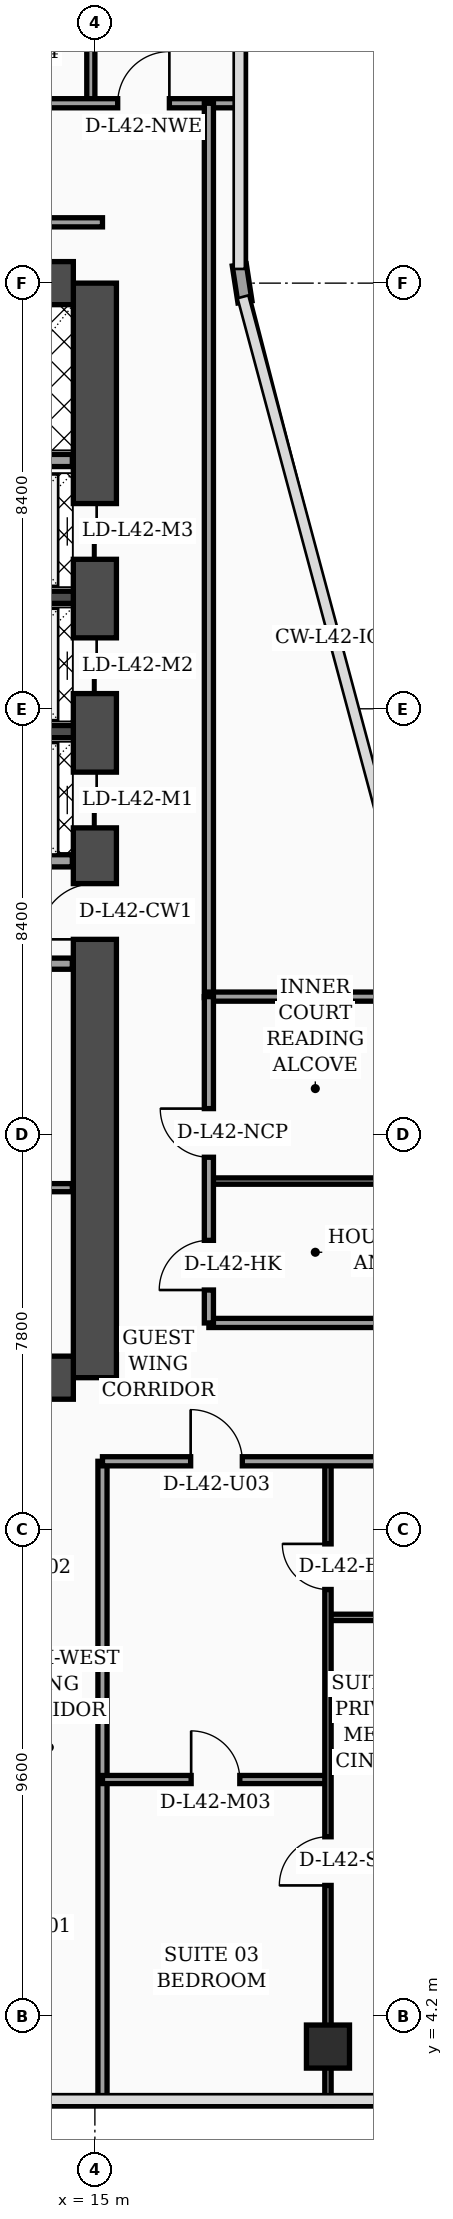
"""IFC4 building model, lengths in metres.
Left out: names, types, materials, properties, quantities, classifications, styles, units other than length and angle.
Written with IfcOpenShell. Run it as: python <this file> out.ifc"""

import sys

from ifc_helpers import new_model, si_unit, direction, frame, frame_2d, origin, origin_2d, place, context, subcontext, project, spatial, rectangle, hollow_rectangle, extrude, element, fill, save


model = new_model("IFC4")
c1 = context("Model", 3, precision=1e-05, world=origin(), true_north=direction((0.0, 1.0)))
c2 = subcontext(c1, "Body", "Model", "MODEL_VIEW")
j1 = project(units=[si_unit("LENGTHUNIT", "METRE"), si_unit("PLANEANGLEUNIT", "RADIAN")], contexts=[c1])
p1 = place(None, origin())
s1 = spatial("IfcSite", under=j1, at=p1, CompositionType="ELEMENT")
p2 = place(p1, origin())
s2 = spatial("IfcBuilding", under=s1, at=p2, CompositionType="ELEMENT")
p3 = place(p2, frame((0.0, 0.0, 171.3)))
s3 = spatial("IfcBuildingStorey", under=s2, at=p3, CompositionType="ELEMENT", Elevation=171.3)
p4 = place(p3, frame((15.0, 16.8, 0.0), z_axis=(0.0, 0.0, 1.0), x_axis=(0.0, 1.0, 0.0)))
e1 = element("IfcWall", 1, at=p4, inside=s3, PredefinedType="SHEAR", context=c2, shape_type="SweptSolid", body=[
    extrude(rectangle(XDim=21.6, YDim=0.85, at=frame_2d((10.8, 0.0))), origin(), (0.0, 0.0, 1.0), 3.56),
])
p5 = place(p4, frame((8.65, 0.0, 0.0)))
e2 = element("IfcOpeningElement", 2, at=p5, cuts=e1, PredefinedType="OPENING", context=c2, shape_type="SweptSolid", body=[
    extrude(rectangle(XDim=1.1, YDim=2.2, at=frame_2d((0.55, 1.1))), frame((0.0, 0.435, 0.0), z_axis=(0.0, -1.0, 0.0), x_axis=(1.0, 0.0, 0.0)), (0.0, 0.0, 1.0), 0.87),
])
p6 = place(p4, frame((10.85, 0.0, 0.0)))
e3 = element("IfcOpeningElement", 3, at=p6, cuts=e1, PredefinedType="OPENING", context=c2, shape_type="SweptSolid", body=[
    extrude(rectangle(XDim=1.1, YDim=2.2, at=frame_2d((0.55, 1.1))), frame((0.0, 0.435, 0.0), z_axis=(0.0, -1.0, 0.0), x_axis=(1.0, 0.0, 0.0)), (0.0, 0.0, 1.0), 0.87),
])
p7 = place(p4, frame((13.5, 0.0, 0.0)))
e4 = element("IfcOpeningElement", 4, at=p7, cuts=e1, PredefinedType="OPENING", context=c2, shape_type="SweptSolid", body=[
    extrude(rectangle(XDim=1.1, YDim=2.2, at=frame_2d((0.55, 1.1))), frame((0.0, 0.435, 0.0), z_axis=(0.0, -1.0, 0.0), x_axis=(1.0, 0.0, 0.0)), (0.0, 0.0, 1.0), 0.87),
])
p8 = place(p4, frame((16.15, 0.0, 0.0)))
e5 = element("IfcOpeningElement", 5, at=p8, cuts=e1, PredefinedType="OPENING", context=c2, shape_type="SweptSolid", body=[
    extrude(rectangle(XDim=1.1, YDim=2.2, at=frame_2d((0.55, 1.1))), frame((0.0, 0.435, 0.0), z_axis=(0.0, -1.0, 0.0), x_axis=(1.0, 0.0, 0.0)), (0.0, 0.0, 1.0), 0.87),
])
for number, where, z_axis, x_axis in (
    (6, (4.625, 38.4, 0.0), (0.0, 0.0, 1.0), (1.0, 0.0, 0.0)),
    (7, (4.625, 16.8, 0.0), (0.0, 0.0, 1.0), (1.0, 0.0, 0.0)),
):
    element("IfcWall", number, at=place(p3, frame(where, z_axis=z_axis, x_axis=x_axis)), inside=s3, PredefinedType="SHEAR", context=c2, shape_type="SweptSolid", body=[
        extrude(rectangle(XDim=9.95, YDim=0.85, at=frame_2d((4.975, 0.0))), origin(), (0.0, 0.0, 1.0), 3.56),
    ])
for number, where, z_axis, x_axis in (
    (8, (12.18, 29.55, 0.0), (0.0, 0.0, 1.0), (1.0, 0.0, 0.0)),
    (9, (12.18, 32.2, 0.0), (0.0, 0.0, 1.0), (1.0, 0.0, 0.0)),
):
    element("IfcWall", number, at=place(p3, frame(where, z_axis=z_axis, x_axis=x_axis)), inside=s3, PredefinedType="SOLIDWALL", context=c2, shape_type="SweptSolid", body=[
        extrude(rectangle(XDim=2.395, YDim=0.24, at=frame_2d((1.198, 0.0))), origin(), (0.0, 0.0, 1.0), 3.56),
    ])
p9 = place(p3, frame((19.6, 3.6, 0.0), z_axis=(0.0, 0.0, 1.0), x_axis=(1.0, 0.0, 0.0)))
e10 = element("IfcColumn", 10, at=p9, inside=s3, PredefinedType="COLUMN", context=c2, shape_type="SweptSolid", body=[
    extrude(hollow_rectangle(XDim=0.85, YDim=0.85, WallThickness=0.036, at=origin_2d()), origin(), (0.0, 0.0, 1.0), 3.56),
])
p10 = place(p3, frame((17.962, 38.03, 0.0), z_axis=(0.0, 0.0, 1.0), x_axis=(-0.15141125477, 0.988470855377, 0.0)))
e11 = element("IfcWall", 11, at=p10, inside=s3, PredefinedType="SOLIDWALL", context=c2, shape_type="SweptSolid", body=[
    extrude(rectangle(XDim=0.739, YDim=0.28, at=frame_2d((0.369, 0.0))), origin(), (0.0, 0.0, 1.0), 3.56),
])
p11 = place(p3, frame((9.68, 20.55, 0.0), z_axis=(0.0, 0.0, 1.0), x_axis=(1.0, 0.0, 0.0)))
e12 = element("IfcWall", 12, at=p11, inside=s3, PredefinedType="PARTITIONING", context=c2, shape_type="SweptSolid", body=[
    extrude(rectangle(XDim=4.875, YDim=0.16, at=frame_2d((2.438, 0.0))), origin(), (0.0, 0.0, 1.0), 3.56),
])
p12 = place(p11, frame((1.1, 0.0, 0.0)))
e13 = element("IfcOpeningElement", 13, at=p12, cuts=e12, PredefinedType="OPENING", context=c2, shape_type="SweptSolid", body=[
    extrude(rectangle(XDim=0.98, YDim=2.15, at=frame_2d((0.49, 1.075))), frame((0.0, 0.09, 0.0), z_axis=(0.0, -1.0, 0.0), x_axis=(1.0, 0.0, 0.0)), (0.0, 0.0, 1.0), 0.18),
])
p13 = place(p3, frame((9.68, 24.97, 0.0), z_axis=(0.0, 0.0, 1.0), x_axis=(1.0, 0.0, 0.0)))
e14 = element("IfcWall", 14, at=p13, inside=s3, PredefinedType="SOLIDWALL", context=c2, shape_type="SweptSolid", body=[
    extrude(rectangle(XDim=4.875, YDim=0.22, at=frame_2d((2.438, 0.0))), origin(), (0.0, 0.0, 1.0), 2.94),
])
p14 = place(p13, frame((0.9, 0.0, 0.0)))
e15 = element("IfcOpeningElement", 15, at=p14, cuts=e14, PredefinedType="OPENING", context=c2, shape_type="SweptSolid", body=[
    extrude(rectangle(XDim=0.98, YDim=2.15, at=frame_2d((0.49, 1.075))), frame((0.0, 0.12, 0.0), z_axis=(0.0, -1.0, 0.0), x_axis=(1.0, 0.0, 0.0)), (0.0, 0.0, 1.0), 0.24),
])
p15 = place(p3, frame((12.25, 27.0, 0.0), z_axis=(0.0, 0.0, 1.0), x_axis=(1.0, 0.0, 0.0)))
e16 = element("IfcWall", 16, at=p15, inside=s3, PredefinedType="SOLIDWALL", context=c2, shape_type="SweptSolid", body=[
    extrude(rectangle(XDim=2.305, YDim=0.24, at=frame_2d((1.152, 0.0))), origin(), (0.0, 0.0, 1.0), 3.56),
])
p16 = place(p3, frame((9.66, 34.9, 0.0), z_axis=(0.0, 0.0, 1.0), x_axis=(1.0, 0.0, 0.0)))
e17 = element("IfcWall", 17, at=p16, inside=s3, PredefinedType="SOLIDWALL", context=c2, shape_type="SweptSolid", body=[
    extrude(rectangle(XDim=4.895, YDim=0.24, at=frame_2d((2.448, 0.0))), origin(), (0.0, 0.0, 1.0), 3.56),
])
p17 = place(p3, frame((15.15, 2.44, 0.0), z_axis=(0.0, 0.0, 1.0), x_axis=(0.0, 1.0, 0.0)))
e18 = element("IfcWall", 18, at=p17, inside=s3, PredefinedType="PARTITIONING", context=c2, shape_type="SweptSolid", body=[
    extrude(rectangle(XDim=12.71, YDim=0.18, at=frame_2d((6.355, 0.0))), origin(), (0.0, 0.0, 1.0), 3.04),
])
p18 = place(p3, frame((19.6, 12.07, 0.0), z_axis=(0.0, 0.0, 1.0), x_axis=(1.0, 0.0, 0.0)))
e19 = element("IfcWall", 19, at=p18, inside=s3, PredefinedType="PARTITIONING", context=c2, shape_type="SweptSolid", body=[
    extrude(rectangle(XDim=2.0, YDim=0.125, at=frame_2d((1.0, 0.0))), origin(), (0.0, 0.0, 1.0), 3.56),
])
p19 = place(p3, frame((15.15, 8.87, 0.0), z_axis=(0.0, 0.0, 1.0), x_axis=(1.0, 0.0, 0.0)))
e20 = element("IfcWall", 20, at=p19, inside=s3, PredefinedType="PARTITIONING", context=c2, shape_type="SweptSolid", body=[
    extrude(rectangle(XDim=4.45, YDim=0.16, at=frame_2d((2.225, 0.0))), origin(), (0.0, 0.0, 1.0), 3.56),
])
p20 = place(p19, frame((1.75, 0.0, 0.0)))
e21 = element("IfcOpeningElement", 21, at=p20, cuts=e20, PredefinedType="OPENING", context=c2, shape_type="SweptSolid", body=[
    extrude(rectangle(XDim=0.96, YDim=2.2, at=frame_2d((0.48, 1.1))), frame((0.0, 0.09, 0.0), z_axis=(0.0, -1.0, 0.0), x_axis=(1.0, 0.0, 0.0)), (0.0, 0.0, 1.0), 0.18),
])
p21 = place(p3, frame((19.6, 2.44, 0.0), z_axis=(0.0, 0.0, 1.0), x_axis=(0.0, 1.0, 0.0)))
e22 = element("IfcWall", 22, at=p21, inside=s3, PredefinedType="PARTITIONING", context=c2, shape_type="SweptSolid", body=[
    extrude(rectangle(XDim=12.71, YDim=0.125, at=frame_2d((6.355, 0.0))), origin(), (0.0, 0.0, 1.0), 2.49),
])
p22 = place(p21, frame((4.34, 0.0, 0.0)))
e23 = element("IfcOpeningElement", 23, at=p22, cuts=e22, PredefinedType="OPENING", context=c2, shape_type="SweptSolid", body=[
    extrude(rectangle(XDim=0.96, YDim=2.2, at=frame_2d((0.48, 1.1))), frame((0.0, 0.073, 0.0), z_axis=(0.0, -1.0, 0.0), x_axis=(1.0, 0.0, 0.0)), (0.0, 0.0, 1.0), 0.145),
])
p23 = place(p21, frame((10.18, 0.0, 0.0)))
e24 = element("IfcOpeningElement", 24, at=p23, cuts=e22, PredefinedType="OPENING", context=c2, shape_type="SweptSolid", body=[
    extrude(rectangle(XDim=0.9, YDim=2.15, at=frame_2d((0.45, 1.075))), frame((0.0, 0.073, 0.0), z_axis=(0.0, -1.0, 0.0), x_axis=(1.0, 0.0, 0.0)), (0.0, 0.0, 1.0), 0.145),
])
p24 = place(p3, frame((15.15, 15.15, 0.0), z_axis=(0.0, 0.0, 1.0), x_axis=(1.0, 0.0, 0.0)))
e25 = element("IfcWall", 25, at=p24, inside=s3, PredefinedType="PARTITIONING", context=c2, shape_type="SweptSolid", body=[
    extrude(rectangle(XDim=6.45, YDim=0.18, at=frame_2d((3.225, 0.0))), origin(), (0.0, 0.0, 1.0), 2.49),
])
p25 = place(p24, frame((1.74, 0.0, 0.0)))
e26 = element("IfcOpeningElement", 26, at=p25, cuts=e25, PredefinedType="OPENING", context=c2, shape_type="SweptSolid", body=[
    extrude(rectangle(XDim=1.02, YDim=2.2, at=frame_2d((0.51, 1.1))), frame((0.0, 0.1, 0.0), z_axis=(0.0, -1.0, 0.0), x_axis=(1.0, 0.0, 0.0)), (0.0, 0.0, 1.0), 0.2),
])
p26 = place(p3, frame((14.92, 41.95, 0.0), z_axis=(0.0, 0.0, 1.0), x_axis=(0.0, 1.0, 0.0)))
e27 = element("IfcWall", 27, at=p26, inside=s3, PredefinedType="PARTITIONING", context=c2, shape_type="SweptSolid", body=[
    extrude(rectangle(XDim=5.85, YDim=0.16, at=frame_2d((2.925, 0.0))), origin(), (0.0, 0.0, 1.0), 3.04),
])
p27 = place(p3, frame((0.08, 41.95, 0.0), z_axis=(0.0, 0.0, 1.0), x_axis=(1.0, 0.0, 0.0)))
e28 = element("IfcWall", 28, at=p27, inside=s3, PredefinedType="PARTITIONING", context=c2, shape_type="SweptSolid", body=[
    extrude(rectangle(XDim=17.77, YDim=0.18, at=frame_2d((8.885, 0.0))), origin(), (0.0, 0.0, 1.0), 2.94),
])
p28 = place(p27, frame((0.9, 0.0, 0.0)))
e29 = element("IfcOpeningElement", 29, at=p28, cuts=e28, PredefinedType="OPENING", context=c2, shape_type="SweptSolid", body=[
    extrude(rectangle(XDim=1.02, YDim=2.2, at=frame_2d((0.51, 1.1))), frame((0.0, 0.1, 0.0), z_axis=(0.0, -1.0, 0.0), x_axis=(1.0, 0.0, 0.0)), (0.0, 0.0, 1.0), 0.2),
])
p29 = place(p27, frame((7.38, 0.0, 0.0)))
e30 = element("IfcOpeningElement", 30, at=p29, cuts=e28, PredefinedType="OPENING", context=c2, shape_type="SweptSolid", body=[
    extrude(rectangle(XDim=1.02, YDim=2.2, at=frame_2d((0.51, 1.1))), frame((0.0, 0.1, 0.0), z_axis=(0.0, -1.0, 0.0), x_axis=(1.0, 0.0, 0.0)), (0.0, 0.0, 1.0), 0.2),
])
p30 = place(p27, frame((15.37, 0.0, 0.0)))
e31 = element("IfcOpeningElement", 31, at=p30, cuts=e28, PredefinedType="OPENING", context=c2, shape_type="SweptSolid", body=[
    extrude(rectangle(XDim=1.02, YDim=2.2, at=frame_2d((0.51, 1.1))), frame((0.0, 0.1, 0.0), z_axis=(0.0, -1.0, 0.0), x_axis=(1.0, 0.0, 0.0)), (0.0, 0.0, 1.0), 0.2),
])
p31 = place(p3, frame((17.25, 24.3, 0.0), z_axis=(0.0, 0.0, 1.0), x_axis=(0.0, 1.0, 0.0)))
e32 = element("IfcWall", 32, at=p31, inside=s3, PredefinedType="PARTITIONING", context=c2, shape_type="SweptSolid", body=[
    extrude(rectangle(XDim=17.65, YDim=0.18, at=frame_2d((8.825, 0.0))), origin(), (0.0, 0.0, 1.0), 2.94),
])
p32 = place(p3, frame((3.755, 39.6, 0.0), z_axis=(0.0, 0.0, 1.0), x_axis=(1.0, 0.0, 0.0)))
e33 = element("IfcWall", 33, at=p32, inside=s3, PredefinedType="PARTITIONING", context=c2, shape_type="SweptSolid", body=[
    extrude(rectangle(XDim=11.395, YDim=0.18, at=frame_2d((5.698, 0.0))), origin(), (0.0, 0.0, 1.0), 2.94),
])
p33 = place(p3, frame((17.25, 17.88, 0.0), z_axis=(0.0, 0.0, 1.0), x_axis=(1.0, 0.0, 0.0)))
e34 = element("IfcWall", 34, at=p33, inside=s3, PredefinedType="PARTITIONING", context=c2, shape_type="SweptSolid", body=[
    extrude(rectangle(XDim=4.3, YDim=0.18, at=frame_2d((2.15, 0.0))), origin(), (0.0, 0.0, 1.0), 3.09),
])
p34 = place(p3, frame((17.25, 20.68, 0.0), z_axis=(0.0, 0.0, 1.0), x_axis=(1.0, 0.0, 0.0)))
e35 = element("IfcWall", 35, at=p34, inside=s3, PredefinedType="PARTITIONING", context=c2, shape_type="SweptSolid", body=[
    extrude(rectangle(XDim=4.3, YDim=0.125, at=frame_2d((2.15, 0.0))), origin(), (0.0, 0.0, 1.0), 3.56),
])
p35 = place(p3, frame((17.25, 24.32, 0.0), z_axis=(0.0, 0.0, 1.0), x_axis=(1.0, 0.0, 0.0)))
e36 = element("IfcWall", 36, at=p35, inside=s3, PredefinedType="PARTITIONING", context=c2, shape_type="SweptSolid", body=[
    extrude(rectangle(XDim=4.35, YDim=0.18, at=frame_2d((2.175, 0.0))), origin(), (0.0, 0.0, 1.0), 3.56),
])
p36 = place(p3, frame((17.25, 17.88, 0.0), z_axis=(0.0, 0.0, 1.0), x_axis=(0.0, 1.0, 0.0)))
e37 = element("IfcWall", 37, at=p36, inside=s3, PredefinedType="PARTITIONING", context=c2, shape_type="SweptSolid", body=[
    extrude(rectangle(XDim=6.44, YDim=0.18, at=frame_2d((3.22, 0.0))), origin(), (0.0, 0.0, 1.0), 3.09),
])
p37 = place(p36, frame((0.65, 0.0, 0.0)))
e38 = element("IfcOpeningElement", 38, at=p37, cuts=e37, PredefinedType="OPENING", context=c2, shape_type="SweptSolid", body=[
    extrude(rectangle(XDim=0.98, YDim=2.15, at=frame_2d((0.49, 1.075))), frame((0.0, 0.1, 0.0), z_axis=(0.0, -1.0, 0.0), x_axis=(1.0, 0.0, 0.0)), (0.0, 0.0, 1.0), 0.2),
])
p38 = place(p36, frame((3.27, 0.0, 0.0)))
e39 = element("IfcOpeningElement", 39, at=p38, cuts=e37, PredefinedType="OPENING", context=c2, shape_type="SweptSolid", body=[
    extrude(rectangle(XDim=0.96, YDim=2.2, at=frame_2d((0.48, 1.1))), frame((0.0, 0.1, 0.0), z_axis=(0.0, -1.0, 0.0), x_axis=(1.0, 0.0, 0.0)), (0.0, 0.0, 1.0), 0.2),
])
p39 = place(p20, origin())
e40 = element("IfcDoor", 40, at=p39, inside=s3, OperationType="SINGLE_SWING_LEFT", PredefinedType="DOOR", context=c2, shape_type="SweptSolid", body=[
    extrude(rectangle(XDim=0.96, YDim=2.2, at=frame_2d((0.48, 1.1))), frame((0.0, 0.025, 0.0), z_axis=(0.0, -1.0, 0.0), x_axis=(1.0, 0.0, 0.0)), (0.0, 0.0, 1.0), 0.05),
])
fill(e21, e40)
p40 = place(p22, origin())
e41 = element("IfcDoor", 41, at=p40, inside=s3, OperationType="SINGLE_SWING_LEFT", PredefinedType="DOOR", context=c2, shape_type="SweptSolid", body=[
    extrude(rectangle(XDim=0.96, YDim=2.2, at=frame_2d((0.48, 1.1))), frame((0.0, 0.025, 0.0), z_axis=(0.0, -1.0, 0.0), x_axis=(1.0, 0.0, 0.0)), (0.0, 0.0, 1.0), 0.05),
])
fill(e23, e41)
p41 = place(p23, origin())
e42 = element("IfcDoor", 42, at=p41, inside=s3, OperationType="SINGLE_SWING_RIGHT", PredefinedType="DOOR", context=c2, shape_type="SweptSolid", body=[
    extrude(rectangle(XDim=0.9, YDim=2.15, at=frame_2d((0.45, 1.075))), frame((0.0, 0.025, 0.0), z_axis=(0.0, -1.0, 0.0), x_axis=(1.0, 0.0, 0.0)), (0.0, 0.0, 1.0), 0.05),
])
fill(e24, e42)
p42 = place(p25, origin())
e43 = element("IfcDoor", 43, at=p42, inside=s3, OperationType="SINGLE_SWING_LEFT", PredefinedType="DOOR", context=c2, shape_type="SweptSolid", body=[
    extrude(rectangle(XDim=1.02, YDim=2.2, at=frame_2d((0.51, 1.1))), frame((0.0, 0.025, 0.0), z_axis=(0.0, -1.0, 0.0), x_axis=(1.0, 0.0, 0.0)), (0.0, 0.0, 1.0), 0.05),
])
fill(e26, e43)
p43 = place(p30, origin())
e44 = element("IfcDoor", 44, at=p43, inside=s3, OperationType="SINGLE_SWING_RIGHT", PredefinedType="DOOR", context=c2, shape_type="SweptSolid", body=[
    extrude(rectangle(XDim=1.02, YDim=2.2, at=frame_2d((0.51, 1.1))), frame((0.0, 0.025, 0.0), z_axis=(0.0, -1.0, 0.0), x_axis=(1.0, 0.0, 0.0)), (0.0, 0.0, 1.0), 0.05),
])
fill(e31, e44)
p44 = place(p37, origin())
e45 = element("IfcDoor", 45, at=p44, inside=s3, OperationType="SINGLE_SWING_LEFT", PredefinedType="DOOR", context=c2, shape_type="SweptSolid", body=[
    extrude(rectangle(XDim=0.98, YDim=2.15, at=frame_2d((0.49, 1.075))), frame((0.0, 0.025, 0.0), z_axis=(0.0, -1.0, 0.0), x_axis=(1.0, 0.0, 0.0)), (0.0, 0.0, 1.0), 0.05),
])
fill(e38, e45)
p45 = place(p38, origin())
e46 = element("IfcDoor", 46, at=p45, inside=s3, OperationType="SINGLE_SWING_RIGHT", PredefinedType="DOOR", context=c2, shape_type="SweptSolid", body=[
    extrude(rectangle(XDim=0.96, YDim=2.2, at=frame_2d((0.48, 1.1))), frame((0.0, 0.025, 0.0), z_axis=(0.0, -1.0, 0.0), x_axis=(1.0, 0.0, 0.0)), (0.0, 0.0, 1.0), 0.05),
])
fill(e39, e46)
p46 = place(p5, origin())
e47 = element("IfcDoor", 47, at=p46, inside=s3, OperationType="SINGLE_SWING_LEFT", PredefinedType="DOOR", context=c2, shape_type="SweptSolid", body=[
    extrude(rectangle(XDim=1.1, YDim=2.2, at=frame_2d((0.55, 1.1))), frame((0.0, 0.025, 0.0), z_axis=(0.0, -1.0, 0.0), x_axis=(1.0, 0.0, 0.0)), (0.0, 0.0, 1.0), 0.05),
])
fill(e2, e47)
p47 = place(p6, origin())
e48 = element("IfcDoor", 48, at=p47, inside=s3, OperationType="DOUBLE_DOOR_SLIDING", PredefinedType="DOOR", context=c2, shape_type="SweptSolid", body=[
    extrude(rectangle(XDim=1.1, YDim=2.2, at=frame_2d((0.55, 1.1))), frame((0.0, 0.025, 0.0), z_axis=(0.0, -1.0, 0.0), x_axis=(1.0, 0.0, 0.0)), (0.0, 0.0, 1.0), 0.05),
])
fill(e3, e48)
p48 = place(p7, origin())
e49 = element("IfcDoor", 49, at=p48, inside=s3, OperationType="DOUBLE_DOOR_SLIDING", PredefinedType="DOOR", context=c2, shape_type="SweptSolid", body=[
    extrude(rectangle(XDim=1.1, YDim=2.2, at=frame_2d((0.55, 1.1))), frame((0.0, 0.025, 0.0), z_axis=(0.0, -1.0, 0.0), x_axis=(1.0, 0.0, 0.0)), (0.0, 0.0, 1.0), 0.05),
])
fill(e4, e49)
p49 = place(p8, origin())
e50 = element("IfcDoor", 50, at=p49, inside=s3, OperationType="DOUBLE_DOOR_SLIDING", PredefinedType="DOOR", context=c2, shape_type="SweptSolid", body=[
    extrude(rectangle(XDim=1.1, YDim=2.2, at=frame_2d((0.55, 1.1))), frame((0.0, 0.025, 0.0), z_axis=(0.0, -1.0, 0.0), x_axis=(1.0, 0.0, 0.0)), (0.0, 0.0, 1.0), 0.05),
])
fill(e5, e50)
save(model, sys.argv[1])
